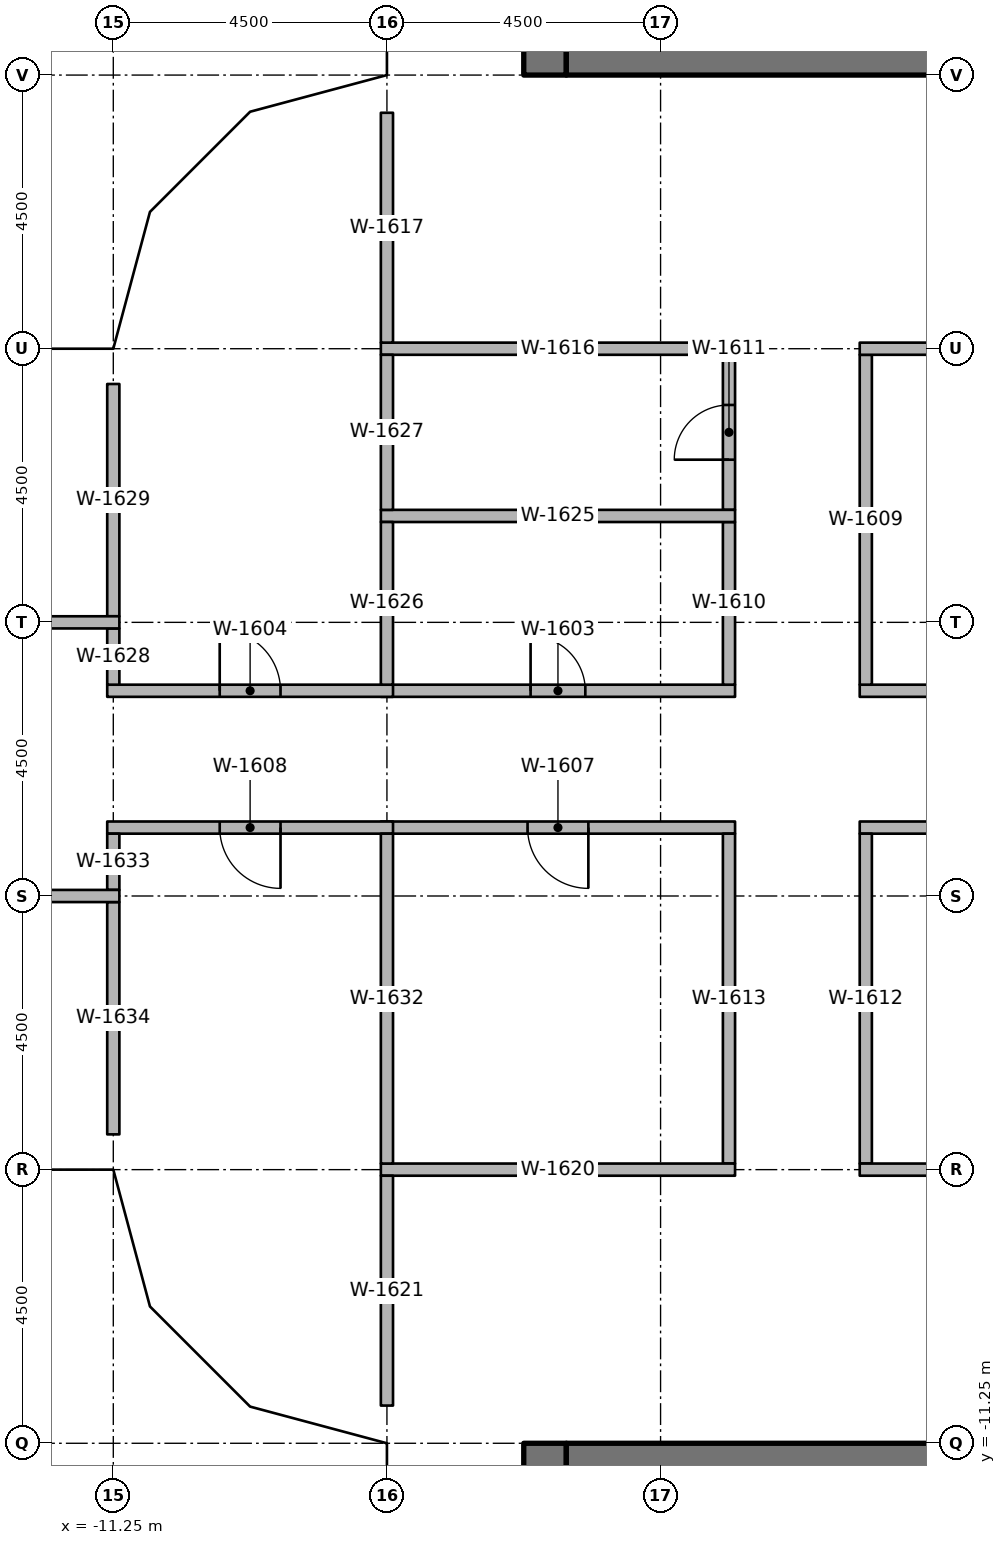
"""IFC4 building model, lengths in metres.
Left out: names, types, materials, properties, quantities, classifications, styles, units other than length and angle.
Written with IfcOpenShell. Run it as: python <this file> out.ifc"""

import sys

from ifc_helpers import new_model, si_unit, direction, frame, frame_2d, origin, origin_2d, place, context, subcontext, project, spatial, rectangle, extrude, element, fill, save


model = new_model("IFC4")
c1 = context("Model", 3, precision=1e-05, world=origin(), true_north=direction((0.0, 1.0)))
c2 = subcontext(c1, "Body", "Model", "MODEL_VIEW")
j1 = project(units=[si_unit("LENGTHUNIT", "METRE"), si_unit("PLANEANGLEUNIT", "RADIAN")], contexts=[c1])
p1 = place(None, origin())
s1 = spatial("IfcSite", under=j1, at=p1, CompositionType="ELEMENT")
p2 = place(p1, origin())
s2 = spatial("IfcBuilding", under=s1, at=p2, CompositionType="ELEMENT")
p3 = place(p2, frame((0.0, 0.0, 156.2)))
s3 = spatial("IfcBuildingStorey", under=s2, at=p3, CompositionType="ELEMENT", Elevation=156.2)
for number, where, z_axis, x_axis in (
    (1, (-10.75, -6.25, 0.0), (0.0, 0.0, 1.0), (1.0, 0.0, 0.0)),
    (2, (-10.75, 6.25, 0.0), (0.0, 0.0, 1.0), (1.0, 0.0, 0.0)),
    (3, (-6.25, -10.75, 0.0), (0.0, 0.0, 1.0), (1.0, 0.0, 0.0)),
    (4, (-6.25, -6.25, 0.0), (0.0, 0.0, 1.0), (1.0, 0.0, 0.0)),
    (5, (-6.25, 6.25, 0.0), (0.0, 0.0, 1.0), (1.0, 0.0, 0.0)),
    (6, (-6.25, 10.75, 0.0), (0.0, 0.0, 1.0), (1.0, 0.0, 0.0)),
):
    element("IfcColumn", number, at=place(p3, frame(where, z_axis=z_axis, x_axis=x_axis)), inside=s3, PredefinedType="COLUMN", context=c2, shape_type="SweptSolid", body=[
        extrude(rectangle(XDim=0.8, YDim=0.8, at=origin_2d()), origin(), (0.0, 0.0, 1.0), 3.65),
    ])
p4 = place(p3, frame((-4.15, 11.25, 0.0), z_axis=(0.0, 0.0, 1.0), x_axis=(0.0, 1.0, 0.0)))
e7 = element("IfcWall", 7, at=p4, inside=s3, PredefinedType="SHEAR", context=c2, shape_type="SweptSolid", body=[
    extrude(rectangle(XDim=15.0, YDim=0.7, at=frame_2d((7.5, 0.0))), origin(), (0.0, 0.0, 1.0), 3.8),
])
p5 = place(p4, frame((7.15, 0.0, 0.0)))
e8 = element("IfcOpeningElement", 8, at=p5, cuts=e7, PredefinedType="OPENING", context=c2, shape_type="SweptSolid", body=[
    extrude(rectangle(XDim=1.5, YDim=2.3, at=frame_2d((0.75, 1.15))), frame((0.0, 0.36, 0.0), z_axis=(0.0, -1.0, 0.0), x_axis=(1.0, 0.0, 0.0)), (0.0, 0.0, 1.0), 0.72),
])
p6 = place(p4, frame((13.9, 0.0, 0.0)))
e9 = element("IfcOpeningElement", 9, at=p6, cuts=e7, PredefinedType="OPENING", context=c2, shape_type="SweptSolid", body=[
    extrude(rectangle(XDim=0.9, YDim=2.1, at=frame_2d((0.45, 1.05))), frame((0.0, 0.36, 0.0), z_axis=(0.0, -1.0, 0.0), x_axis=(1.0, 0.0, 0.0)), (0.0, 0.0, 1.0), 0.72),
])
p7 = place(p4, frame((1.15, 0.0, 0.0)))
e10 = element("IfcOpeningElement", 10, at=p7, cuts=e7, PredefinedType="OPENING", context=c2, shape_type="SweptSolid", body=[
    extrude(rectangle(XDim=1.2, YDim=2.1, at=frame_2d((0.6, 1.05))), frame((0.0, 0.36, 0.0), z_axis=(0.0, -1.0, 0.0), x_axis=(1.0, 0.0, 0.0)), (0.0, 0.0, 1.0), 0.72),
])
p8 = place(p3, frame((-3.8, 11.6, 0.0), z_axis=(0.0, 0.0, 1.0), x_axis=(1.0, 0.0, 0.0)))
e11 = element("IfcWall", 11, at=p8, inside=s3, PredefinedType="SHEAR", context=c2, shape_type="SweptSolid", body=[
    extrude(rectangle(XDim=7.6, YDim=0.7, at=frame_2d((3.8, 0.0))), origin(), (0.0, 0.0, 1.0), 3.8),
])
p9 = place(p3, frame((-4.15, -11.25, 0.0), z_axis=(0.0, 0.0, 1.0), x_axis=(0.0, -1.0, 0.0)))
e12 = element("IfcWall", 12, at=p9, inside=s3, PredefinedType="SHEAR", context=c2, shape_type="SweptSolid", body=[
    extrude(rectangle(XDim=15.0, YDim=0.7, at=frame_2d((7.5, 0.0))), origin(), (0.0, 0.0, 1.0), 3.8),
])
p10 = place(p9, frame((7.15, 0.0, 0.0)))
e13 = element("IfcOpeningElement", 13, at=p10, cuts=e12, PredefinedType="OPENING", context=c2, shape_type="SweptSolid", body=[
    extrude(rectangle(XDim=1.5, YDim=2.3, at=frame_2d((0.75, 1.15))), frame((0.0, 0.36, 0.0), z_axis=(0.0, -1.0, 0.0), x_axis=(1.0, 0.0, 0.0)), (0.0, 0.0, 1.0), 0.72),
])
p11 = place(p9, frame((5.55, 0.0, 0.0)))
e14 = element("IfcOpeningElement", 14, at=p11, cuts=e12, PredefinedType="OPENING", context=c2, shape_type="SweptSolid", body=[
    extrude(rectangle(XDim=1.2, YDim=2.1, at=frame_2d((0.6, 1.05))), frame((0.0, 0.36, 0.0), z_axis=(0.0, -1.0, 0.0), x_axis=(1.0, 0.0, 0.0)), (0.0, 0.0, 1.0), 0.72),
])
p12 = place(p3, frame((-3.8, -11.6, 0.0), z_axis=(0.0, 0.0, 1.0), x_axis=(1.0, 0.0, 0.0)))
e15 = element("IfcWall", 15, at=p12, inside=s3, PredefinedType="SHEAR", context=c2, shape_type="SweptSolid", body=[
    extrude(rectangle(XDim=7.6, YDim=0.7, at=frame_2d((3.8, 0.0))), origin(), (0.0, 0.0, 1.0), 3.8),
])
p13 = place(p3, frame((1.025, 1.125, 0.0), z_axis=(0.0, 0.0, 1.0), x_axis=(1.0, 0.0, 0.0)))
e16 = element("IfcWall", 16, at=p13, inside=s3, PredefinedType="PARTITIONING", context=c2, shape_type="SweptSolid", body=[
    extrude(rectangle(XDim=5.825, YDim=0.2, at=frame_2d((2.913, 0.0))), origin(), (0.0, 0.0, 1.0), 2.75),
])
p14 = place(p13, frame((2.413, 0.0, 0.0)))
e17 = element("IfcOpeningElement", 17, at=p14, cuts=e16, PredefinedType="OPENING", context=c2, shape_type="SweptSolid", body=[
    extrude(rectangle(XDim=1.0, YDim=2.1, at=frame_2d((0.5, 1.05))), frame((0.0, 0.11, 0.0), z_axis=(0.0, -1.0, 0.0), x_axis=(1.0, 0.0, 0.0)), (0.0, 0.0, 1.0), 0.22),
])
p15 = place(p3, frame((-6.85, 1.125, 0.0), z_axis=(0.0, 0.0, 1.0), x_axis=(1.0, 0.0, 0.0)))
e18 = element("IfcWall", 18, at=p15, inside=s3, PredefinedType="PARTITIONING", context=c2, shape_type="SweptSolid", body=[
    extrude(rectangle(XDim=5.825, YDim=0.2, at=frame_2d((2.913, 0.0))), origin(), (0.0, 0.0, 1.0), 2.75),
])
p16 = place(p15, frame((2.462, 0.0, 0.0)))
e19 = element("IfcOpeningElement", 19, at=p16, cuts=e18, PredefinedType="OPENING", context=c2, shape_type="SweptSolid", body=[
    extrude(rectangle(XDim=0.9, YDim=2.1, at=frame_2d((0.45, 1.05))), frame((0.0, 0.11, 0.0), z_axis=(0.0, -1.0, 0.0), x_axis=(1.0, 0.0, 0.0)), (0.0, 0.0, 1.0), 0.22),
])
p17 = place(p3, frame((-11.35, 1.125, 0.0), z_axis=(0.0, 0.0, 1.0), x_axis=(1.0, 0.0, 0.0)))
e20 = element("IfcWall", 20, at=p17, inside=s3, PredefinedType="PARTITIONING", context=c2, shape_type="SweptSolid", body=[
    extrude(rectangle(XDim=4.7, YDim=0.2, at=frame_2d((2.35, 0.0))), origin(), (0.0, 0.0, 1.0), 2.75),
])
p18 = place(p17, frame((1.85, 0.0, 0.0)))
e21 = element("IfcOpeningElement", 21, at=p18, cuts=e20, PredefinedType="OPENING", context=c2, shape_type="SweptSolid", body=[
    extrude(rectangle(XDim=1.0, YDim=2.1, at=frame_2d((0.5, 1.05))), frame((0.0, 0.11, 0.0), z_axis=(0.0, -1.0, 0.0), x_axis=(1.0, 0.0, 0.0)), (0.0, 0.0, 1.0), 0.22),
])
p19 = place(p3, frame((6.85, -1.125, 0.0), z_axis=(0.0, 0.0, 1.0), x_axis=(-1.0, 0.0, 0.0)))
e22 = element("IfcWall", 22, at=p19, inside=s3, PredefinedType="PARTITIONING", context=c2, shape_type="SweptSolid", body=[
    extrude(rectangle(XDim=5.825, YDim=0.2, at=frame_2d((2.913, 0.0))), origin(), (0.0, 0.0, 1.0), 2.75),
])
p20 = place(p19, frame((2.413, 0.0, 0.0)))
e23 = element("IfcOpeningElement", 23, at=p20, cuts=e22, PredefinedType="OPENING", context=c2, shape_type="SweptSolid", body=[
    extrude(rectangle(XDim=1.0, YDim=2.1, at=frame_2d((0.5, 1.05))), frame((0.0, 0.11, 0.0), z_axis=(0.0, -1.0, 0.0), x_axis=(1.0, 0.0, 0.0)), (0.0, 0.0, 1.0), 0.22),
])
p21 = place(p3, frame((-1.025, -1.125, 0.0), z_axis=(0.0, 0.0, 1.0), x_axis=(-1.0, 0.0, 0.0)))
e24 = element("IfcWall", 24, at=p21, inside=s3, PredefinedType="PARTITIONING", context=c2, shape_type="SweptSolid", body=[
    extrude(rectangle(XDim=5.825, YDim=0.2, at=frame_2d((2.913, 0.0))), origin(), (0.0, 0.0, 1.0), 2.75),
])
p22 = place(p21, frame((2.413, 0.0, 0.0)))
e25 = element("IfcOpeningElement", 25, at=p22, cuts=e24, PredefinedType="OPENING", context=c2, shape_type="SweptSolid", body=[
    extrude(rectangle(XDim=1.0, YDim=2.1, at=frame_2d((0.5, 1.05))), frame((0.0, 0.11, 0.0), z_axis=(0.0, -1.0, 0.0), x_axis=(1.0, 0.0, 0.0)), (0.0, 0.0, 1.0), 0.22),
])
p23 = place(p3, frame((-6.65, -1.125, 0.0), z_axis=(0.0, 0.0, 1.0), x_axis=(-1.0, 0.0, 0.0)))
e26 = element("IfcWall", 26, at=p23, inside=s3, PredefinedType="PARTITIONING", context=c2, shape_type="SweptSolid", body=[
    extrude(rectangle(XDim=4.7, YDim=0.2, at=frame_2d((2.35, 0.0))), origin(), (0.0, 0.0, 1.0), 2.75),
])
p24 = place(p23, frame((1.85, 0.0, 0.0)))
e27 = element("IfcOpeningElement", 27, at=p24, cuts=e26, PredefinedType="OPENING", context=c2, shape_type="SweptSolid", body=[
    extrude(rectangle(XDim=1.0, YDim=2.1, at=frame_2d((0.5, 1.05))), frame((0.0, 0.11, 0.0), z_axis=(0.0, -1.0, 0.0), x_axis=(1.0, 0.0, 0.0)), (0.0, 0.0, 1.0), 0.22),
])
p25 = place(p3, frame((1.125, 1.225, 0.0), z_axis=(0.0, 0.0, 1.0), x_axis=(0.0, 1.0, 0.0)))
e28 = element("IfcWall", 28, at=p25, inside=s3, PredefinedType="PARTITIONING", context=c2, shape_type="SweptSolid", body=[
    extrude(rectangle(XDim=5.425, YDim=0.2, at=frame_2d((2.712, 0.0))), origin(), (0.0, 0.0, 1.0), 2.75),
])
p26 = place(p3, frame((-1.125, 1.225, 0.0), z_axis=(0.0, 0.0, 1.0), x_axis=(0.0, 1.0, 0.0)))
e29 = element("IfcWall", 29, at=p26, inside=s3, PredefinedType="PARTITIONING", context=c2, shape_type="SweptSolid", body=[
    extrude(rectangle(XDim=2.675, YDim=0.2, at=frame_2d((1.337, 0.0))), origin(), (0.0, 0.0, 1.0), 2.75),
])
p27 = place(p3, frame((-1.125, 4.1, 0.0), z_axis=(0.0, 0.0, 1.0), x_axis=(0.0, 1.0, 0.0)))
e30 = element("IfcWall", 30, at=p27, inside=s3, PredefinedType="PARTITIONING", context=c2, shape_type="SweptSolid", body=[
    extrude(rectangle(XDim=2.55, YDim=0.2, at=frame_2d((1.275, 0.0))), origin(), (0.0, 0.0, 1.0), 2.75),
])
p28 = place(p27, frame((0.825, 0.0, 0.0)))
e31 = element("IfcOpeningElement", 31, at=p28, cuts=e30, PredefinedType="OPENING", context=c2, shape_type="SweptSolid", body=[
    extrude(rectangle(XDim=0.9, YDim=2.1, at=frame_2d((0.45, 1.05))), frame((0.0, 0.11, 0.0), z_axis=(0.0, -1.0, 0.0), x_axis=(1.0, 0.0, 0.0)), (0.0, 0.0, 1.0), 0.22),
])
for number, where, z_axis, x_axis in (
    (32, (1.125, -6.65, 0.0), (0.0, 0.0, 1.0), (0.0, 1.0, 0.0)),
    (33, (-1.125, -6.65, 0.0), (0.0, 0.0, 1.0), (0.0, 1.0, 0.0)),
):
    element("IfcWall", number, at=place(p3, frame(where, z_axis=z_axis, x_axis=x_axis)), inside=s3, PredefinedType="PARTITIONING", context=c2, shape_type="SweptSolid", body=[
        extrude(rectangle(XDim=5.425, YDim=0.2, at=frame_2d((2.712, 0.0))), origin(), (0.0, 0.0, 1.0), 2.75),
    ])
for number, where, z_axis, x_axis in (
    (34, (1.025, 6.75, 0.0), (0.0, 0.0, 1.0), (1.0, 0.0, 0.0)),
    (35, (-6.85, 6.75, 0.0), (0.0, 0.0, 1.0), (1.0, 0.0, 0.0)),
):
    element("IfcWall", number, at=place(p3, frame(where, z_axis=z_axis, x_axis=x_axis)), inside=s3, PredefinedType="PARTITIONING", context=c2, shape_type="SweptSolid", body=[
        extrude(rectangle(XDim=5.825, YDim=0.2, at=frame_2d((2.913, 0.0))), origin(), (0.0, 0.0, 1.0), 2.75),
    ])
p29 = place(p3, frame((-6.75, 6.85, 0.0), z_axis=(0.0, 0.0, 1.0), x_axis=(0.0, 1.0, 0.0)))
e36 = element("IfcWall", 36, at=p29, inside=s3, PredefinedType="PARTITIONING", context=c2, shape_type="SweptSolid", body=[
    extrude(rectangle(XDim=3.78, YDim=0.2, at=frame_2d((1.89, 0.0))), origin(), (0.0, 0.0, 1.0), 2.75),
])
for number, where, z_axis, x_axis in (
    (37, (1.025, -6.75, 0.0), (0.0, 0.0, 1.0), (1.0, 0.0, 0.0)),
    (38, (-6.85, -6.75, 0.0), (0.0, 0.0, 1.0), (1.0, 0.0, 0.0)),
):
    element("IfcWall", number, at=place(p3, frame(where, z_axis=z_axis, x_axis=x_axis)), inside=s3, PredefinedType="PARTITIONING", context=c2, shape_type="SweptSolid", body=[
        extrude(rectangle(XDim=5.825, YDim=0.2, at=frame_2d((2.913, 0.0))), origin(), (0.0, 0.0, 1.0), 2.75),
    ])
p30 = place(p3, frame((-6.75, -10.63, 0.0), z_axis=(0.0, 0.0, 1.0), x_axis=(0.0, 1.0, 0.0)))
e39 = element("IfcWall", 39, at=p30, inside=s3, PredefinedType="PARTITIONING", context=c2, shape_type="SweptSolid", body=[
    extrude(rectangle(XDim=3.78, YDim=0.2, at=frame_2d((1.89, 0.0))), origin(), (0.0, 0.0, 1.0), 2.75),
])
p31 = place(p3, frame((-6.85, 4.0, 0.0), z_axis=(0.0, 0.0, 1.0), x_axis=(1.0, 0.0, 0.0)))
e40 = element("IfcWall", 40, at=p31, inside=s3, PredefinedType="PARTITIONING", context=c2, shape_type="SweptSolid", body=[
    extrude(rectangle(XDim=5.825, YDim=0.2, at=frame_2d((2.913, 0.0))), origin(), (0.0, 0.0, 1.0), 2.75),
])
p32 = place(p3, frame((-6.75, 1.225, 0.0), z_axis=(0.0, 0.0, 1.0), x_axis=(0.0, 1.0, 0.0)))
e41 = element("IfcWall", 41, at=p32, inside=s3, PredefinedType="PARTITIONING", context=c2, shape_type="SweptSolid", body=[
    extrude(rectangle(XDim=2.675, YDim=0.2, at=frame_2d((1.337, 0.0))), origin(), (0.0, 0.0, 1.0), 2.75),
])
p33 = place(p3, frame((-6.75, 4.1, 0.0), z_axis=(0.0, 0.0, 1.0), x_axis=(0.0, 1.0, 0.0)))
e42 = element("IfcWall", 42, at=p33, inside=s3, PredefinedType="PARTITIONING", context=c2, shape_type="SweptSolid", body=[
    extrude(rectangle(XDim=2.55, YDim=0.2, at=frame_2d((1.275, 0.0))), origin(), (0.0, 0.0, 1.0), 2.75),
])
p34 = place(p3, frame((-11.25, 1.225, 0.0), z_axis=(0.0, 0.0, 1.0), x_axis=(0.0, 1.0, 0.0)))
e43 = element("IfcWall", 43, at=p34, inside=s3, PredefinedType="PARTITIONING", context=c2, shape_type="SweptSolid", body=[
    extrude(rectangle(XDim=0.925, YDim=0.2, at=frame_2d((0.462, 0.0))), origin(), (0.0, 0.0, 1.0), 2.75),
])
p35 = place(p3, frame((-11.25, 2.35, 0.0), z_axis=(0.0, 0.0, 1.0), x_axis=(0.0, 1.0, 0.0)))
e44 = element("IfcWall", 44, at=p35, inside=s3, PredefinedType="PARTITIONING", context=c2, shape_type="SweptSolid", body=[
    extrude(rectangle(XDim=3.82, YDim=0.2, at=frame_2d((1.91, 0.0))), origin(), (0.0, 0.0, 1.0), 2.75),
])
p36 = place(p3, frame((-6.75, -6.65, 0.0), z_axis=(0.0, 0.0, 1.0), x_axis=(0.0, 1.0, 0.0)))
e45 = element("IfcWall", 45, at=p36, inside=s3, PredefinedType="PARTITIONING", context=c2, shape_type="SweptSolid", body=[
    extrude(rectangle(XDim=5.425, YDim=0.2, at=frame_2d((2.712, 0.0))), origin(), (0.0, 0.0, 1.0), 2.75),
])
p37 = place(p3, frame((-11.25, -2.15, 0.0), z_axis=(0.0, 0.0, 1.0), x_axis=(0.0, 1.0, 0.0)))
e46 = element("IfcWall", 46, at=p37, inside=s3, PredefinedType="PARTITIONING", context=c2, shape_type="SweptSolid", body=[
    extrude(rectangle(XDim=0.925, YDim=0.2, at=frame_2d((0.462, 0.0))), origin(), (0.0, 0.0, 1.0), 2.75),
])
p38 = place(p3, frame((-11.25, -6.17, 0.0), z_axis=(0.0, 0.0, 1.0), x_axis=(0.0, 1.0, 0.0)))
e47 = element("IfcWall", 47, at=p38, inside=s3, PredefinedType="PARTITIONING", context=c2, shape_type="SweptSolid", body=[
    extrude(rectangle(XDim=3.82, YDim=0.2, at=frame_2d((1.91, 0.0))), origin(), (0.0, 0.0, 1.0), 2.75),
])
p39 = place(p3, frame((-15.85, 2.25, 0.0), z_axis=(0.0, 0.0, 1.0), x_axis=(1.0, 0.0, 0.0)))
e48 = element("IfcWall", 48, at=p39, inside=s3, PredefinedType="PARTITIONING", context=c2, shape_type="SweptSolid", body=[
    extrude(rectangle(XDim=4.7, YDim=0.2, at=frame_2d((2.35, 0.0))), origin(), (0.0, 0.0, 1.0), 2.75),
])
p40 = place(p39, frame((1.85, 0.0, 0.0)))
e49 = element("IfcOpeningElement", 49, at=p40, cuts=e48, PredefinedType="OPENING", context=c2, shape_type="SweptSolid", body=[
    extrude(rectangle(XDim=1.0, YDim=2.1, at=frame_2d((0.5, 1.05))), frame((0.0, 0.11, 0.0), z_axis=(0.0, -1.0, 0.0), x_axis=(1.0, 0.0, 0.0)), (0.0, 0.0, 1.0), 0.22),
])
p41 = place(p3, frame((-11.15, -2.25, 0.0), z_axis=(0.0, 0.0, 1.0), x_axis=(-1.0, 0.0, 0.0)))
e50 = element("IfcWall", 50, at=p41, inside=s3, PredefinedType="PARTITIONING", context=c2, shape_type="SweptSolid", body=[
    extrude(rectangle(XDim=4.7, YDim=0.2, at=frame_2d((2.35, 0.0))), origin(), (0.0, 0.0, 1.0), 2.75),
])
p42 = place(p41, frame((1.85, 0.0, 0.0)))
e51 = element("IfcOpeningElement", 51, at=p42, cuts=e50, PredefinedType="OPENING", context=c2, shape_type="SweptSolid", body=[
    extrude(rectangle(XDim=1.0, YDim=2.1, at=frame_2d((0.5, 1.05))), frame((0.0, 0.11, 0.0), z_axis=(0.0, -1.0, 0.0), x_axis=(1.0, 0.0, 0.0)), (0.0, 0.0, 1.0), 0.22),
])
p43 = place(p16, origin())
e52 = element("IfcDoor", 52, at=p43, inside=s3, OperationType="SINGLE_SWING_RIGHT", PredefinedType="DOOR", context=c2, shape_type="SweptSolid", body=[
    extrude(rectangle(XDim=0.9, YDim=2.1, at=frame_2d((0.45, 1.05))), frame((0.0, 0.025, 0.0), z_axis=(0.0, -1.0, 0.0), x_axis=(1.0, 0.0, 0.0)), (0.0, 0.0, 1.0), 0.05),
])
fill(e19, e52)
p44 = place(p28, origin())
e53 = element("IfcDoor", 53, at=p44, inside=s3, OperationType="SINGLE_SWING_RIGHT", PredefinedType="DOOR", context=c2, shape_type="SweptSolid", body=[
    extrude(rectangle(XDim=0.9, YDim=2.1, at=frame_2d((0.45, 1.05))), frame((0.0, 0.025, 0.0), z_axis=(0.0, -1.0, 0.0), x_axis=(1.0, 0.0, 0.0)), (0.0, 0.0, 1.0), 0.05),
])
fill(e31, e53)
p45 = place(p18, origin())
e54 = element("IfcDoor", 54, at=p45, inside=s3, OperationType="SINGLE_SWING_RIGHT", PredefinedType="DOOR", context=c2, shape_type="SweptSolid", body=[
    extrude(rectangle(XDim=1.0, YDim=2.1, at=frame_2d((0.5, 1.05))), frame((0.0, 0.025, 0.0), z_axis=(0.0, -1.0, 0.0), x_axis=(1.0, 0.0, 0.0)), (0.0, 0.0, 1.0), 0.05),
])
fill(e21, e54)
p46 = place(p22, origin())
e55 = element("IfcDoor", 55, at=p46, inside=s3, OperationType="SINGLE_SWING_RIGHT", PredefinedType="DOOR", context=c2, shape_type="SweptSolid", body=[
    extrude(rectangle(XDim=1.0, YDim=2.1, at=frame_2d((0.5, 1.05))), frame((0.0, 0.025, 0.0), z_axis=(0.0, -1.0, 0.0), x_axis=(1.0, 0.0, 0.0)), (0.0, 0.0, 1.0), 0.05),
])
fill(e25, e55)
p47 = place(p24, origin())
e56 = element("IfcDoor", 56, at=p47, inside=s3, OperationType="SINGLE_SWING_RIGHT", PredefinedType="DOOR", context=c2, shape_type="SweptSolid", body=[
    extrude(rectangle(XDim=1.0, YDim=2.1, at=frame_2d((0.5, 1.05))), frame((0.0, 0.025, 0.0), z_axis=(0.0, -1.0, 0.0), x_axis=(1.0, 0.0, 0.0)), (0.0, 0.0, 1.0), 0.05),
])
fill(e27, e56)
save(model, sys.argv[1])
